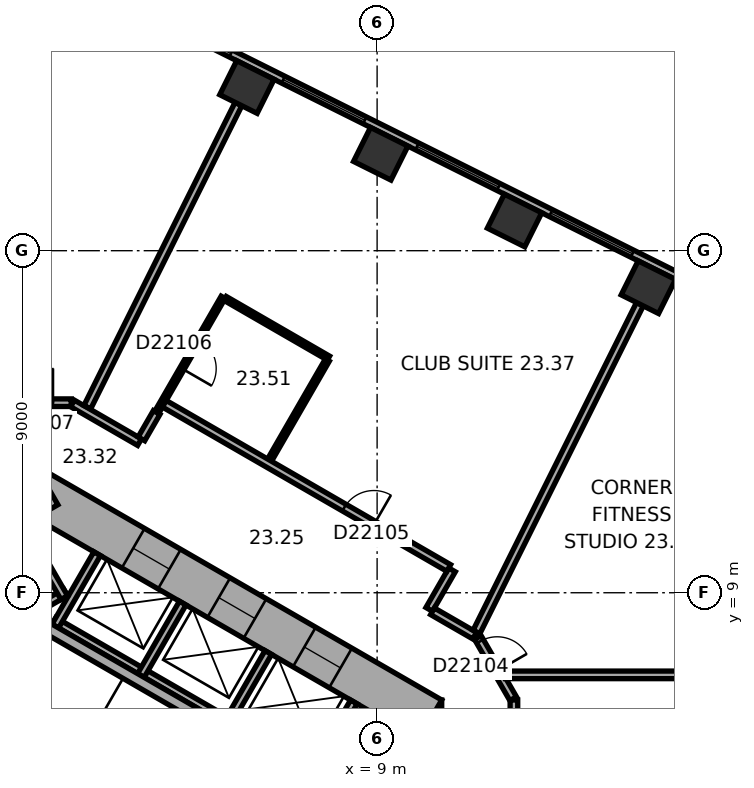
"""IFC4 building model, lengths in metres.
Left out: names, types, materials, properties, quantities, classifications, styles, units other than length and angle.
Written with IfcOpenShell. Run it as: python <this file> out.ifc"""

import sys

from ifc_helpers import new_model, si_unit, direction, frame, frame_2d, origin, origin_2d, place, context, subcontext, project, spatial, rectangle, extrude, element, fill, save


model = new_model("IFC4")
c1 = context("Model", 3, precision=1e-05, world=origin(), true_north=direction((0.0, 1.0)))
c2 = subcontext(c1, "Body", "Model", "MODEL_VIEW")
j1 = project(units=[si_unit("LENGTHUNIT", "METRE"), si_unit("PLANEANGLEUNIT", "RADIAN")], contexts=[c1])
p1 = place(None, origin())
s1 = spatial("IfcSite", under=j1, at=p1, CompositionType="ELEMENT")
p2 = place(p1, origin())
s2 = spatial("IfcBuilding", under=s1, at=p2, CompositionType="ELEMENT")
p3 = place(p2, frame((0.0, 0.0, 100.1)))
s3 = spatial("IfcBuildingStorey", under=s2, at=p3, CompositionType="ELEMENT", Elevation=100.1)
for number, where, z_axis, x_axis in (
    (1, (16.138, 17.04, 0.0), (0.0, 0.0, 1.0), (-0.895, 0.446, 0.0)),
    (2, (12.616, 18.795, 0.0), (0.0, 0.0, 1.0), (-0.895, 0.446, 0.0)),
    (3, (9.095, 20.551, 0.0), (0.0, 0.0, 1.0), (-0.895, 0.446, 0.0)),
    (4, (5.574, 22.306, 0.0), (0.0, 0.0, 1.0), (-0.895, 0.446, 0.0)),
):
    element("IfcColumn", number, at=place(p3, frame(where, z_axis=z_axis, x_axis=x_axis)), inside=s3, PredefinedType="COLUMN", context=c2, shape_type="SweptSolid", body=[
        extrude(rectangle(XDim=1.1, YDim=1.0, at=origin_2d()), origin(), (0.0, 0.0, 1.0), 3.3),
    ])
p4 = place(p3, frame((10.1, -6.177, 0.0), z_axis=(0.0, 0.0, 1.0), x_axis=(0.0, 1.0, 0.0)))
e5 = element("IfcWall", 5, at=p4, inside=s3, PredefinedType="SHEAR", context=c2, shape_type="SweptSolid", body=[
    extrude(rectangle(XDim=12.355, YDim=1.2, at=frame_2d((6.177, 0.0))), origin(), (0.0, 0.0, 1.0), 3.3),
])
p5 = place(p4, frame((6.378, 0.0, 0.0)))
e6 = element("IfcOpeningElement", 6, at=p5, cuts=e5, PredefinedType="OPENING", context=c2, shape_type="SweptSolid", body=[
    extrude(rectangle(XDim=1.5, YDim=2.1, at=frame_2d((0.75, 1.05))), frame((0.0, 0.61, 0.0), z_axis=(0.0, -1.0, 0.0), x_axis=(1.0, 0.0, 0.0)), (0.0, 0.0, 1.0), 1.22),
])
p6 = place(p4, frame((1.828, 0.0, 0.0)))
e7 = element("IfcOpeningElement", 7, at=p6, cuts=e5, PredefinedType="OPENING", context=c2, shape_type="SweptSolid", body=[
    extrude(rectangle(XDim=1.1, YDim=2.1, at=frame_2d((0.55, 1.05))), frame((0.0, 0.61, 0.0), z_axis=(0.0, -1.0, 0.0), x_axis=(1.0, 0.0, 0.0)), (0.0, 0.0, 1.0), 1.22),
])
p7 = place(p4, frame((4.427, 0.0, 0.0)))
e8 = element("IfcOpeningElement", 8, at=p7, cuts=e5, PredefinedType="OPENING", context=c2, shape_type="SweptSolid", body=[
    extrude(rectangle(XDim=1.1, YDim=2.1, at=frame_2d((0.55, 1.05))), frame((0.0, 0.61, 0.0), z_axis=(0.0, -1.0, 0.0), x_axis=(1.0, 0.0, 0.0)), (0.0, 0.0, 1.0), 1.22),
])
p8 = place(p3, frame((10.4, 5.658, 0.0), z_axis=(0.0, 0.0, 1.0), x_axis=(-0.866021384402, 0.500006961711, 0.0)))
e9 = element("IfcWall", 9, at=p8, inside=s3, PredefinedType="SHEAR", context=c2, shape_type="SweptSolid", body=[
    extrude(rectangle(XDim=12.355, YDim=1.2, at=frame_2d((6.178, 0.0))), origin(), (0.0, 0.0, 1.0), 3.3),
])
p9 = place(p8, frame((2.728, 0.0, 0.0)))
e10 = element("IfcOpeningElement", 10, at=p9, cuts=e9, PredefinedType="OPENING", context=c2, shape_type="SweptSolid", body=[
    extrude(rectangle(XDim=1.1, YDim=2.1, at=frame_2d((0.55, 1.05))), frame((0.0, 0.61, 0.0), z_axis=(0.0, -1.0, 0.0), x_axis=(1.0, 0.0, 0.0)), (0.0, 0.0, 1.0), 1.22),
])
p10 = place(p8, frame((5.328, 0.0, 0.0)))
e11 = element("IfcOpeningElement", 11, at=p10, cuts=e9, PredefinedType="OPENING", context=c2, shape_type="SweptSolid", body=[
    extrude(rectangle(XDim=1.1, YDim=2.1, at=frame_2d((0.55, 1.05))), frame((0.0, 0.61, 0.0), z_axis=(0.0, -1.0, 0.0), x_axis=(1.0, 0.0, 0.0)), (0.0, 0.0, 1.0), 1.22),
])
p11 = place(p8, frame((7.928, 0.0, 0.0)))
e12 = element("IfcOpeningElement", 12, at=p11, cuts=e9, PredefinedType="OPENING", context=c2, shape_type="SweptSolid", body=[
    extrude(rectangle(XDim=1.1, YDim=2.1, at=frame_2d((0.55, 1.05))), frame((0.0, 0.61, 0.0), z_axis=(0.0, -1.0, 0.0), x_axis=(1.0, 0.0, 0.0)), (0.0, 0.0, 1.0), 1.22),
])
p12 = place(p3, frame((0.3, 11.836, 0.0), z_axis=(0.0, 0.0, 1.0), x_axis=(-0.866021384402, -0.500006961711, 0.0)))
e13 = element("IfcWall", 13, at=p12, inside=s3, PredefinedType="SHEAR", context=c2, shape_type="SweptSolid", body=[
    extrude(rectangle(XDim=12.355, YDim=1.2, at=frame_2d((6.178, 0.0))), origin(), (0.0, 0.0, 1.0), 3.3),
])
p13 = place(p12, frame((6.378, 0.0, 0.0)))
e14 = element("IfcOpeningElement", 14, at=p13, cuts=e13, PredefinedType="OPENING", context=c2, shape_type="SweptSolid", body=[
    extrude(rectangle(XDim=1.5, YDim=2.1, at=frame_2d((0.75, 1.05))), frame((0.0, 0.61, 0.0), z_axis=(0.0, -1.0, 0.0), x_axis=(1.0, 0.0, 0.0)), (0.0, 0.0, 1.0), 1.22),
])
p14 = place(p12, frame((1.828, 0.0, 0.0)))
e15 = element("IfcOpeningElement", 15, at=p14, cuts=e13, PredefinedType="OPENING", context=c2, shape_type="SweptSolid", body=[
    extrude(rectangle(XDim=1.1, YDim=2.1, at=frame_2d((0.55, 1.05))), frame((0.0, 0.61, 0.0), z_axis=(0.0, -1.0, 0.0), x_axis=(1.0, 0.0, 0.0)), (0.0, 0.0, 1.0), 1.22),
])
p15 = place(p3, frame((20.63, 15.47, 0.0), z_axis=(0.0, 0.0, 1.0), x_axis=(-0.894934518609, 0.446197498203, 0.0)))
e16 = element("IfcWall", 16, at=p15, inside=s3, PredefinedType="STANDARD", context=c2, shape_type="SweptSolid", body=[
    extrude(rectangle(XDim=21.246, YDim=0.2, at=frame_2d((10.623, 0.0))), origin(), (0.0, 0.0, 1.0), 3.3),
])
p16 = place(p15, frame((1.553, 0.0, 0.8)))
e17 = element("IfcOpeningElement", 17, at=p16, cuts=e16, PredefinedType="OPENING", context=c2, shape_type="SweptSolid", body=[
    extrude(rectangle(XDim=2.4, YDim=1.7, at=frame_2d((1.2, 0.85))), frame((0.0, 0.11, 0.0), z_axis=(0.0, -1.0, 0.0), x_axis=(1.0, 0.0, 0.0)), (0.0, 0.0, 1.0), 0.22),
])
p17 = place(p15, frame((5.488, 0.0, 0.8)))
e18 = element("IfcOpeningElement", 18, at=p17, cuts=e16, PredefinedType="OPENING", context=c2, shape_type="SweptSolid", body=[
    extrude(rectangle(XDim=2.4, YDim=1.7, at=frame_2d((1.2, 0.85))), frame((0.0, 0.11, 0.0), z_axis=(0.0, -1.0, 0.0), x_axis=(1.0, 0.0, 0.0)), (0.0, 0.0, 1.0), 0.22),
])
p18 = place(p15, frame((9.422, 0.0, 0.8)))
e19 = element("IfcOpeningElement", 19, at=p18, cuts=e16, PredefinedType="OPENING", context=c2, shape_type="SweptSolid", body=[
    extrude(rectangle(XDim=2.4, YDim=1.7, at=frame_2d((1.2, 0.85))), frame((0.0, 0.11, 0.0), z_axis=(0.0, -1.0, 0.0), x_axis=(1.0, 0.0, 0.0)), (0.0, 0.0, 1.0), 0.22),
])
p19 = place(p15, frame((13.357, 0.0, 0.8)))
e20 = element("IfcOpeningElement", 20, at=p19, cuts=e16, PredefinedType="OPENING", context=c2, shape_type="SweptSolid", body=[
    extrude(rectangle(XDim=2.4, YDim=1.7, at=frame_2d((1.2, 0.85))), frame((0.0, 0.11, 0.0), z_axis=(0.0, -1.0, 0.0), x_axis=(1.0, 0.0, 0.0)), (0.0, 0.0, 1.0), 0.22),
])
p20 = place(p15, frame((17.292, 0.0, 0.8)))
e21 = element("IfcOpeningElement", 21, at=p20, cuts=e16, PredefinedType="OPENING", context=c2, shape_type="SweptSolid", body=[
    extrude(rectangle(XDim=2.4, YDim=1.7, at=frame_2d((1.2, 0.85))), frame((0.0, 0.11, 0.0), z_axis=(0.0, -1.0, 0.0), x_axis=(1.0, 0.0, 0.0)), (0.0, 0.0, 1.0), 0.22),
])
p21 = place(p3, frame((7.424, 4.259, 0.0), z_axis=(0.0, 0.0, 1.0), x_axis=(-0.866026010844, 0.49999894854, 0.0)))
e22 = element("IfcWall", 22, at=p21, inside=s3, PredefinedType="PARTITIONING", context=c2, shape_type="SweptSolid", body=[
    extrude(rectangle(XDim=8.0, YDim=0.2, at=frame_2d((4.0, 0.0))), origin(), (0.0, 0.0, 1.0), 3.05),
])
for number, where, z_axis, x_axis in (
    (23, (7.287, 4.222, 0.0), (0.0, 0.0, 1.0), (0.5, 0.866, 0.0)),
    (24, (5.036, 5.522, 0.0), (0.0, 0.0, 1.0), (0.5, 0.866, 0.0)),
    (25, (2.784, 6.822, 0.0), (0.0, 0.0, 1.0), (0.5, 0.866, 0.0)),
    (26, (0.532, 8.122, 0.0), (0.0, 0.0, 1.0), (0.5, 0.866, 0.0)),
):
    element("IfcWall", number, at=place(p3, frame(where, z_axis=z_axis, x_axis=x_axis)), inside=s3, PredefinedType="PARTITIONING", context=c2, shape_type="SweptSolid", body=[
        extrude(rectangle(XDim=2.2, YDim=0.2, at=frame_2d((1.1, 0.0))), origin(), (0.0, 0.0, 1.0), 3.05),
    ])
p22 = place(p3, frame((0.803, 9.009, 0.0), z_axis=(0.0, 0.0, 1.0), x_axis=(-0.866028230842, -0.499995103361, 0.0)))
e27 = element("IfcWall", 27, at=p22, inside=s3, PredefinedType="PARTITIONING", context=c2, shape_type="SweptSolid", body=[
    extrude(rectangle(XDim=5.4, YDim=0.2, at=frame_2d((2.7, 0.0))), origin(), (0.0, 0.0, 1.0), 3.05),
])
p23 = place(p3, frame((0.767, 8.872, 0.0), z_axis=(0.0, 0.0, 1.0), x_axis=(-0.499994660107, 0.866028486751, 0.0)))
e28 = element("IfcWall", 28, at=p23, inside=s3, PredefinedType="PARTITIONING", context=c2, shape_type="SweptSolid", body=[
    extrude(rectangle(XDim=2.2, YDim=0.2, at=frame_2d((1.1, 0.0))), origin(), (0.0, 0.0, 1.0), 3.05),
])
p24 = place(p3, frame((6.303, 4.617, 0.0), z_axis=(0.0, 0.0, 1.0), x_axis=(-0.866027801685, 0.499995846692, 0.0)))
e29 = element("IfcWall", 29, at=p24, inside=s3, PredefinedType="SHEAR", context=c2, shape_type="SweptSolid", body=[
    extrude(rectangle(XDim=7.06, YDim=0.3, at=frame_2d((3.53, 0.0))), origin(), (0.0, 0.0, 1.0), 3.05),
])
p25 = place(p3, frame((0.95, 14.001, 0.0), z_axis=(0.0, 0.0, 1.0), x_axis=(-1.0, 0.0, 0.0)))
e30 = element("IfcWall", 30, at=p25, inside=s3, PredefinedType="PARTITIONING", context=c2, shape_type="SweptSolid", body=[
    extrude(rectangle(XDim=1.86, YDim=0.2, at=frame_2d((0.93, 0.0))), origin(), (0.0, 0.0, 1.0), 3.05),
])
p26 = place(p25, frame((0.48, 0.0, 0.0)))
e31 = element("IfcOpeningElement", 31, at=p26, cuts=e30, PredefinedType="OPENING", context=c2, shape_type="SweptSolid", body=[
    extrude(rectangle(XDim=0.9, YDim=2.1, at=frame_2d((0.45, 1.05))), frame((0.0, 0.11, 0.0), z_axis=(0.0, -1.0, 0.0), x_axis=(1.0, 0.0, 0.0)), (0.0, 0.0, 1.0), 0.22),
])
p27 = place(p3, frame((2.748, 12.962, 0.0), z_axis=(0.0, 0.0, 1.0), x_axis=(-0.866013897511, 0.50001992892, 0.0)))
e32 = element("IfcWall", 32, at=p27, inside=s3, PredefinedType="PARTITIONING", context=c2, shape_type="SweptSolid", body=[
    extrude(rectangle(XDim=2.037, YDim=0.2, at=frame_2d((1.018, 0.0))), origin(), (0.0, 0.0, 1.0), 3.05),
])
p28 = place(p3, frame((3.199, 13.743, 0.0), z_axis=(0.0, 0.0, 1.0), x_axis=(-0.500170954823, -0.865926680471, 0.0)))
e33 = element("IfcWall", 33, at=p28, inside=s3, PredefinedType="PARTITIONING", context=c2, shape_type="SweptSolid", body=[
    extrude(rectangle(XDim=0.801, YDim=0.2, at=frame_2d((0.4, 0.0))), origin(), (0.0, 0.0, 1.0), 3.05),
])
p29 = place(p3, frame((3.232, 13.8, 0.0), z_axis=(0.0, 0.0, 1.0), x_axis=(0.499993265928, 0.866029291668, 0.0)))
e34 = element("IfcWall", 34, at=p29, inside=s3, PredefinedType="PARTITIONING", context=c2, shape_type="SweptSolid", body=[
    extrude(rectangle(XDim=3.434, YDim=0.12, at=frame_2d((1.717, 0.0))), origin(), (0.0, 0.0, 1.0), 3.05),
])
p30 = place(p29, frame((1.267, 0.0, 0.0)))
e35 = element("IfcOpeningElement", 35, at=p30, cuts=e34, PredefinedType="OPENING", context=c2, shape_type="SweptSolid", body=[
    extrude(rectangle(XDim=0.9, YDim=2.1, at=frame_2d((0.45, 1.05))), frame((0.0, 0.07, 0.0), z_axis=(0.0, -1.0, 0.0), x_axis=(1.0, 0.0, 0.0)), (0.0, 0.0, 1.0), 0.14),
])
p31 = place(p3, frame((5.001, 16.744, 0.0), z_axis=(0.0, 0.0, 1.0), x_axis=(0.866009488468, -0.500027565123, 0.0)))
e36 = element("IfcWall", 36, at=p31, inside=s3, PredefinedType="PARTITIONING", context=c2, shape_type="SweptSolid", body=[
    extrude(rectangle(XDim=3.14, YDim=0.12, at=frame_2d((1.57, 0.0))), origin(), (0.0, 0.0, 1.0), 3.05),
])
p32 = place(p3, frame((5.351, 21.859, 0.0), z_axis=(0.0, 0.0, 1.0), x_axis=(-0.446205309328, -0.894930624086, 0.0)))
e37 = element("IfcWall", 37, at=p32, inside=s3, PredefinedType="PARTITIONING", context=c2, shape_type="SweptSolid", body=[
    extrude(rectangle(XDim=8.913, YDim=0.2, at=frame_2d((4.457, 0.0))), origin(), (0.0, 0.0, 1.0), 2.6),
])
p33 = place(p3, frame((7.69, 15.122, 0.0), z_axis=(0.0, 0.0, 1.0), x_axis=(-0.499991248344, -0.866030456496, 0.0)))
e38 = element("IfcWall", 38, at=p33, inside=s3, PredefinedType="PARTITIONING", context=c2, shape_type="SweptSolid", body=[
    extrude(rectangle(XDim=3.04, YDim=0.12, at=frame_2d((1.52, 0.0))), origin(), (0.0, 0.0, 1.0), 3.05),
])
p34 = place(p3, frame((10.371, 8.561, 0.0), z_axis=(0.0, 0.0, 1.0), x_axis=(0.499986357472, 0.866033280158, 0.0)))
e39 = element("IfcWall", 39, at=p34, inside=s3, PredefinedType="PARTITIONING", context=c2, shape_type="SweptSolid", body=[
    extrude(rectangle(XDim=1.201, YDim=0.2, at=frame_2d((0.601, 0.0))), origin(), (0.0, 0.0, 1.0), 3.05),
])
p35 = place(p3, frame((10.885, 9.652, 0.0), z_axis=(0.0, 0.0, 1.0), x_axis=(-0.866033630405, 0.499985750804, 0.0)))
e40 = element("IfcWall", 40, at=p35, inside=s3, PredefinedType="PARTITIONING", context=c2, shape_type="SweptSolid", body=[
    extrude(rectangle(XDim=8.642, YDim=0.2, at=frame_2d((4.321, 0.0))), origin(), (0.0, 0.0, 1.0), 3.05),
])
p36 = place(p35, frame((2.276, 0.0, 0.0)))
e41 = element("IfcOpeningElement", 41, at=p36, cuts=e40, PredefinedType="OPENING", context=c2, shape_type="SweptSolid", body=[
    extrude(rectangle(XDim=0.9, YDim=2.1, at=frame_2d((0.45, 1.05))), frame((0.0, 0.11, 0.0), z_axis=(0.0, -1.0, 0.0), x_axis=(1.0, 0.0, 0.0)), (0.0, 0.0, 1.0), 0.22),
])
p37 = place(p3, frame((11.566, 7.871, 0.0), z_axis=(0.0, 0.0, 1.0), x_axis=(-0.866004557827, 0.500036104519, 0.0)))
e42 = element("IfcWall", 42, at=p37, inside=s3, PredefinedType="PARTITIONING", context=c2, shape_type="SweptSolid", body=[
    extrude(rectangle(XDim=1.28, YDim=0.2, at=frame_2d((0.64, 0.0))), origin(), (0.0, 0.0, 1.0), 3.05),
])
p38 = place(p3, frame((12.58, 6.212, 0.0), z_axis=(0.0, 0.0, 1.0), x_axis=(-0.500063286585, 0.865988862174, 0.0)))
e43 = element("IfcWall", 43, at=p38, inside=s3, PredefinedType="PARTITIONING", context=c2, shape_type="SweptSolid", body=[
    extrude(rectangle(XDim=1.86, YDim=0.2, at=frame_2d((0.93, 0.0))), origin(), (0.0, 0.0, 1.0), 3.05),
])
p39 = place(p38, frame((0.842, 0.0, 0.0)))
e44 = element("IfcOpeningElement", 44, at=p39, cuts=e43, PredefinedType="OPENING", context=c2, shape_type="SweptSolid", body=[
    extrude(rectangle(XDim=0.9, YDim=2.1, at=frame_2d((0.45, 1.05))), frame((0.0, 0.11, 0.0), z_axis=(0.0, -1.0, 0.0), x_axis=(1.0, 0.0, 0.0)), (0.0, 0.0, 1.0), 0.22),
])
p40 = place(p3, frame((12.6, 3.004, 0.0), z_axis=(0.0, 0.0, 1.0), x_axis=(0.0, 1.0, 0.0)))
e45 = element("IfcWall", 45, at=p40, inside=s3, PredefinedType="PARTITIONING", context=c2, shape_type="SweptSolid", body=[
    extrude(rectangle(XDim=3.173, YDim=0.2, at=frame_2d((1.586, 0.0))), origin(), (0.0, 0.0, 1.0), 3.05),
])
p41 = place(p40, frame((1.136, 0.0, 0.0)))
e46 = element("IfcOpeningElement", 46, at=p41, cuts=e45, PredefinedType="OPENING", context=c2, shape_type="SweptSolid", body=[
    extrude(rectangle(XDim=0.9, YDim=2.1, at=frame_2d((0.45, 1.05))), frame((0.0, 0.11, 0.0), z_axis=(0.0, -1.0, 0.0), x_axis=(1.0, 0.0, 0.0)), (0.0, 0.0, 1.0), 0.22),
])
p42 = place(p3, frame((15.915, 16.592, 0.0), z_axis=(0.0, 0.0, 1.0), x_axis=(-0.446199736347, -0.894933402709, 0.0)))
e47 = element("IfcWall", 47, at=p42, inside=s3, PredefinedType="PARTITIONING", context=c2, shape_type="SweptSolid", body=[
    extrude(rectangle(XDim=9.635, YDim=0.2, at=frame_2d((4.817, 0.0))), origin(), (0.0, 0.0, 1.0), 3.05),
])
p43 = place(p3, frame((21.95, 6.839, 0.0), z_axis=(0.0, 0.0, 1.0), x_axis=(-1.0, 0.0, 0.0)))
e48 = element("IfcWall", 48, at=p43, inside=s3, PredefinedType="PARTITIONING", context=c2, shape_type="SweptSolid", body=[
    extrude(rectangle(XDim=9.572, YDim=0.2, at=frame_2d((4.786, 0.0))), origin(), (0.0, 0.0, 1.0), 3.05),
])
p44 = place(p17, origin())
e49 = element("IfcWindow", 49, at=p44, inside=s3, PartitioningType="SINGLE_PANEL", PredefinedType="WINDOW", context=c2, shape_type="SweptSolid", body=[
    extrude(rectangle(XDim=2.4, YDim=1.7, at=frame_2d((1.2, 0.85))), frame((0.0, 0.03, 0.0), z_axis=(0.0, -1.0, 0.0), x_axis=(1.0, 0.0, 0.0)), (0.0, 0.0, 1.0), 0.06),
])
fill(e18, e49)
p45 = place(p18, origin())
e50 = element("IfcWindow", 50, at=p45, inside=s3, PartitioningType="SINGLE_PANEL", PredefinedType="WINDOW", context=c2, shape_type="SweptSolid", body=[
    extrude(rectangle(XDim=2.4, YDim=1.7, at=frame_2d((1.2, 0.85))), frame((0.0, 0.03, 0.0), z_axis=(0.0, -1.0, 0.0), x_axis=(1.0, 0.0, 0.0)), (0.0, 0.0, 1.0), 0.06),
])
fill(e19, e50)
p46 = place(p19, origin())
e51 = element("IfcWindow", 51, at=p46, inside=s3, PartitioningType="SINGLE_PANEL", PredefinedType="WINDOW", context=c2, shape_type="SweptSolid", body=[
    extrude(rectangle(XDim=2.4, YDim=1.7, at=frame_2d((1.2, 0.85))), frame((0.0, 0.03, 0.0), z_axis=(0.0, -1.0, 0.0), x_axis=(1.0, 0.0, 0.0)), (0.0, 0.0, 1.0), 0.06),
])
fill(e20, e51)
p47 = place(p20, origin())
e52 = element("IfcWindow", 52, at=p47, inside=s3, PartitioningType="SINGLE_PANEL", PredefinedType="WINDOW", context=c2, shape_type="SweptSolid", body=[
    extrude(rectangle(XDim=2.4, YDim=1.7, at=frame_2d((1.2, 0.85))), frame((0.0, 0.03, 0.0), z_axis=(0.0, -1.0, 0.0), x_axis=(1.0, 0.0, 0.0)), (0.0, 0.0, 1.0), 0.06),
])
fill(e21, e52)
p48 = place(p9, origin())
e53 = element("IfcDoor", 53, at=p48, inside=s3, OperationType="DOUBLE_DOOR_SLIDING", PredefinedType="DOOR", context=c2, shape_type="SweptSolid", body=[
    extrude(rectangle(XDim=1.1, YDim=2.1, at=frame_2d((0.55, 1.05))), frame((0.0, 0.025, 0.0), z_axis=(0.0, -1.0, 0.0), x_axis=(1.0, 0.0, 0.0)), (0.0, 0.0, 1.0), 0.05),
])
fill(e10, e53)
p49 = place(p10, origin())
e54 = element("IfcDoor", 54, at=p49, inside=s3, OperationType="DOUBLE_DOOR_SLIDING", PredefinedType="DOOR", context=c2, shape_type="SweptSolid", body=[
    extrude(rectangle(XDim=1.1, YDim=2.1, at=frame_2d((0.55, 1.05))), frame((0.0, 0.025, 0.0), z_axis=(0.0, -1.0, 0.0), x_axis=(1.0, 0.0, 0.0)), (0.0, 0.0, 1.0), 0.05),
])
fill(e11, e54)
p50 = place(p11, origin())
e55 = element("IfcDoor", 55, at=p50, inside=s3, OperationType="DOUBLE_DOOR_SLIDING", PredefinedType="DOOR", context=c2, shape_type="SweptSolid", body=[
    extrude(rectangle(XDim=1.1, YDim=2.1, at=frame_2d((0.55, 1.05))), frame((0.0, 0.025, 0.0), z_axis=(0.0, -1.0, 0.0), x_axis=(1.0, 0.0, 0.0)), (0.0, 0.0, 1.0), 0.05),
])
fill(e12, e55)
p51 = place(p39, origin())
e56 = element("IfcDoor", 56, at=p51, inside=s3, OperationType="SINGLE_SWING_LEFT", PredefinedType="DOOR", context=c2, shape_type="SweptSolid", body=[
    extrude(rectangle(XDim=0.9, YDim=2.1, at=frame_2d((0.45, 1.05))), frame((0.0, 0.025, 0.0), z_axis=(0.0, -1.0, 0.0), x_axis=(1.0, 0.0, 0.0)), (0.0, 0.0, 1.0), 0.05),
])
fill(e44, e56)
p52 = place(p36, origin())
e57 = element("IfcDoor", 57, at=p52, inside=s3, OperationType="SINGLE_SWING_LEFT", PredefinedType="DOOR", context=c2, shape_type="SweptSolid", body=[
    extrude(rectangle(XDim=0.9, YDim=2.1, at=frame_2d((0.45, 1.05))), frame((0.0, 0.025, 0.0), z_axis=(0.0, -1.0, 0.0), x_axis=(1.0, 0.0, 0.0)), (0.0, 0.0, 1.0), 0.05),
])
fill(e41, e57)
p53 = place(p30, origin())
e58 = element("IfcDoor", 58, at=p53, inside=s3, OperationType="SINGLE_SWING_LEFT", PredefinedType="DOOR", context=c2, shape_type="SweptSolid", body=[
    extrude(rectangle(XDim=0.9, YDim=2.1, at=frame_2d((0.45, 1.05))), frame((0.0, 0.025, 0.0), z_axis=(0.0, -1.0, 0.0), x_axis=(1.0, 0.0, 0.0)), (0.0, 0.0, 1.0), 0.05),
])
fill(e35, e58)
p54 = place(p26, origin())
e59 = element("IfcDoor", 59, at=p54, inside=s3, OperationType="SINGLE_SWING_LEFT", PredefinedType="DOOR", context=c2, shape_type="SweptSolid", body=[
    extrude(rectangle(XDim=0.9, YDim=2.1, at=frame_2d((0.45, 1.05))), frame((0.0, 0.025, 0.0), z_axis=(0.0, -1.0, 0.0), x_axis=(1.0, 0.0, 0.0)), (0.0, 0.0, 1.0), 0.05),
])
fill(e31, e59)
save(model, sys.argv[1])
